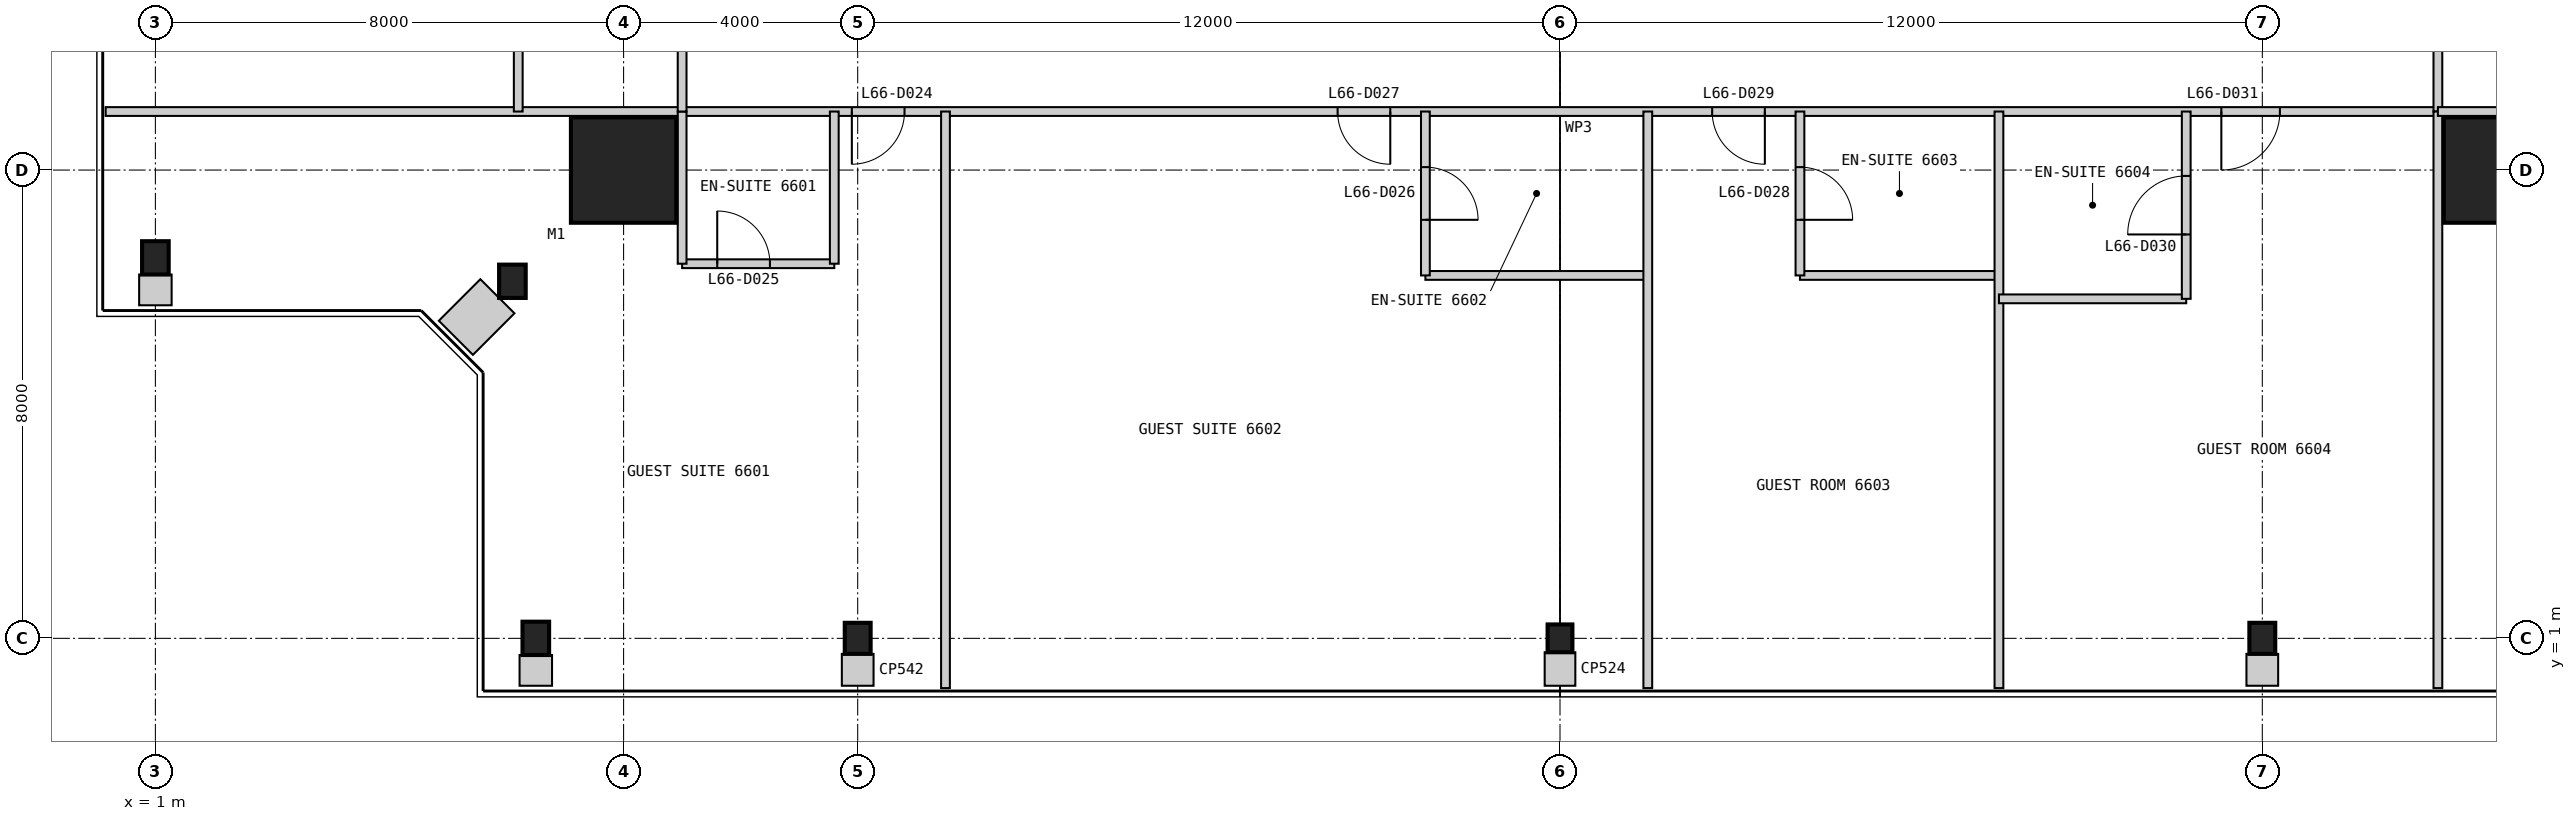
"""IFC4 building model, lengths in metres.
Left out: names, types, materials, properties, quantities, classifications, styles, units other than length and angle.
Written with IfcOpenShell. Run it as: python <this file> out.ifc"""

import sys

from ifc_helpers import new_model, si_unit, direction, frame, frame_2d, origin, origin_2d, place, context, subcontext, project, spatial, rectangle, i_section, extrude, element, fill, save


model = new_model("IFC4")
c1 = context("Model", 3, precision=1e-05, world=origin(), true_north=direction((0.0, 1.0)))
c2 = subcontext(c1, "Body", "Model", "MODEL_VIEW")
j1 = project(units=[si_unit("LENGTHUNIT", "METRE"), si_unit("PLANEANGLEUNIT", "RADIAN")], contexts=[c1])
p1 = place(None, origin())
s1 = spatial("IfcSite", under=j1, at=p1, CompositionType="ELEMENT")
p2 = place(p1, origin())
s2 = spatial("IfcBuilding", under=s1, at=p2, CompositionType="ELEMENT")
p3 = place(p2, frame((0.0, 0.0, 276.4)))
s3 = spatial("IfcBuildingStorey", under=s2, at=p3, CompositionType="ELEMENT", Elevation=276.4)
for number, where, z_axis, x_axis in (
    (1, (9.0, 9.0, 0.0), (0.0, 0.0, 1.0), (1.0, 0.0, 0.0)),
    (2, (41.0, 9.0, 0.0), (0.0, 0.0, 1.0), (1.0, 0.0, 0.0)),
):
    element("IfcColumn", number, at=place(p3, frame(where, z_axis=z_axis, x_axis=x_axis)), inside=s3, PredefinedType="COLUMN", context=c2, shape_type="SweptSolid", body=[
        extrude(rectangle(XDim=1.8, YDim=1.8, at=origin_2d()), origin(), (0.0, 0.0, 1.0), 3.4),
    ])
p4 = place(p3, frame((7.5, 1.0, 0.0), z_axis=(0.0, 0.0, 1.0), x_axis=(1.0, 0.0, 0.0)))
e3 = element("IfcColumn", 3, at=p4, inside=s3, PredefinedType="COLUMN", context=c2, shape_type="SweptSolid", body=[
    extrude(i_section(OverallWidth=0.455, OverallDepth=0.569, WebThickness=0.078, FlangeThickness=0.125, at=origin_2d()), origin(), (0.0, 0.0, 1.0), 3.4),
])
p5 = place(p3, frame((13.0, 1.0, 0.0), z_axis=(0.0, 0.0, 1.0), x_axis=(1.0, 0.0, 0.0)))
e4 = element("IfcColumn", 4, at=p5, inside=s3, PredefinedType="COLUMN", context=c2, shape_type="SweptSolid", body=[
    extrude(i_section(OverallWidth=0.442, OverallDepth=0.531, WebThickness=0.066, FlangeThickness=0.106, at=origin_2d()), origin(), (0.0, 0.0, 1.0), 3.4),
])
p6 = place(p3, frame((25.0, 1.0, 0.0), z_axis=(0.0, 0.0, 1.0), x_axis=(1.0, 0.0, 0.0)))
e5 = element("IfcColumn", 5, at=p6, inside=s3, PredefinedType="COLUMN", context=c2, shape_type="SweptSolid", body=[
    extrude(i_section(OverallWidth=0.424, OverallDepth=0.475, WebThickness=0.048, FlangeThickness=0.077, at=origin_2d()), origin(), (0.0, 0.0, 1.0), 3.4),
])
p7 = place(p3, frame((37.0, 1.0, 0.0), z_axis=(0.0, 0.0, 1.0), x_axis=(1.0, 0.0, 0.0)))
e6 = element("IfcColumn", 6, at=p7, inside=s3, PredefinedType="COLUMN", context=c2, shape_type="SweptSolid", body=[
    extrude(i_section(OverallWidth=0.442, OverallDepth=0.531, WebThickness=0.066, FlangeThickness=0.106, at=origin_2d()), origin(), (0.0, 0.0, 1.0), 3.4),
])
for number, where, z_axis, x_axis in (
    (7, (1.0, 7.5, 0.0), (0.0, 0.0, 1.0), (1.0, 0.0, 0.0)),
    (8, (7.1, 7.1, 0.0), (0.0, 0.0, 1.0), (1.0, 0.0, 0.0)),
):
    element("IfcColumn", number, at=place(p3, frame(where, z_axis=z_axis, x_axis=x_axis)), inside=s3, PredefinedType="COLUMN", context=c2, shape_type="SweptSolid", body=[
        extrude(i_section(OverallWidth=0.455, OverallDepth=0.569, WebThickness=0.078, FlangeThickness=0.125, at=origin_2d()), origin(), (0.0, 0.0, 1.0), 3.4),
    ])
p8 = place(p3, frame((10.0, 10.0, 0.0), z_axis=(0.0, 0.0, 1.0), x_axis=(1.0, 0.0, 0.0)))
e9 = element("IfcWall", 9, at=p8, inside=s3, PredefinedType="PARTITIONING", context=c2, shape_type="SweptSolid", body=[
    extrude(rectangle(XDim=30.0, YDim=0.15, at=frame_2d((15.0, 0.0))), origin(), (0.0, 0.0, 1.0), 3.25),
])
p9 = place(p8, frame((2.9, 0.0, 0.0)))
e10 = element("IfcOpeningElement", 10, at=p9, cuts=e9, PredefinedType="OPENING", context=c2, shape_type="SweptSolid", body=[
    extrude(rectangle(XDim=0.9, YDim=2.1, at=frame_2d((0.45, 1.05))), frame((0.0, 0.085, 0.0), z_axis=(0.0, -1.0, 0.0), x_axis=(1.0, 0.0, 0.0)), (0.0, 0.0, 1.0), 0.17),
])
p10 = place(p8, frame((11.2, 0.0, 0.0)))
e11 = element("IfcOpeningElement", 11, at=p10, cuts=e9, PredefinedType="OPENING", context=c2, shape_type="SweptSolid", body=[
    extrude(rectangle(XDim=0.9, YDim=2.1, at=frame_2d((0.45, 1.05))), frame((0.0, 0.085, 0.0), z_axis=(0.0, -1.0, 0.0), x_axis=(1.0, 0.0, 0.0)), (0.0, 0.0, 1.0), 0.17),
])
p11 = place(p8, frame((17.6, 0.0, 0.0)))
e12 = element("IfcOpeningElement", 12, at=p11, cuts=e9, PredefinedType="OPENING", context=c2, shape_type="SweptSolid", body=[
    extrude(rectangle(XDim=0.9, YDim=2.1, at=frame_2d((0.45, 1.05))), frame((0.0, 0.085, 0.0), z_axis=(0.0, -1.0, 0.0), x_axis=(1.0, 0.0, 0.0)), (0.0, 0.0, 1.0), 0.17),
])
p12 = place(p8, frame((26.3, 0.0, 0.0)))
e13 = element("IfcOpeningElement", 13, at=p12, cuts=e9, PredefinedType="OPENING", context=c2, shape_type="SweptSolid", body=[
    extrude(rectangle(XDim=1.0, YDim=2.1, at=frame_2d((0.5, 1.05))), frame((0.0, 0.085, 0.0), z_axis=(0.0, -1.0, 0.0), x_axis=(1.0, 0.0, 0.0)), (0.0, 0.0, 1.0), 0.17),
])
p13 = place(p3, frame((0.15, 10.0, 0.0), z_axis=(0.0, 0.0, 1.0), x_axis=(1.0, 0.0, 0.0)))
e14 = element("IfcWall", 14, at=p13, inside=s3, PredefinedType="PARTITIONING", context=c2, shape_type="SweptSolid", body=[
    extrude(rectangle(XDim=9.85, YDim=0.15, at=frame_2d((4.925, 0.0))), origin(), (0.0, 0.0, 1.0), 3.25),
])
p14 = place(p3, frame((10.0, 7.4, 0.0), z_axis=(0.0, 0.0, 1.0), x_axis=(1.0, 0.0, 0.0)))
e15 = element("IfcWall", 15, at=p14, inside=s3, PredefinedType="PARTITIONING", context=c2, shape_type="SweptSolid", body=[
    extrude(rectangle(XDim=2.6, YDim=0.15, at=frame_2d((1.3, 0.0))), origin(), (0.0, 0.0, 1.0), 3.25),
])
p15 = place(p14, frame((0.6, 0.0, 0.0)))
e16 = element("IfcOpeningElement", 16, at=p15, cuts=e15, PredefinedType="OPENING", context=c2, shape_type="SweptSolid", body=[
    extrude(rectangle(XDim=0.9, YDim=2.1, at=frame_2d((0.45, 1.05))), frame((0.0, 0.085, 0.0), z_axis=(0.0, -1.0, 0.0), x_axis=(1.0, 0.0, 0.0)), (0.0, 0.0, 1.0), 0.17),
])
for number, where, z_axis, x_axis in (
    (17, (10.0, 7.4, 0.0), (0.0, 0.0, 1.0), (0.0, 1.0, 0.0)),
    (18, (12.6, 7.4, 0.0), (0.0, 0.0, 1.0), (0.0, 1.0, 0.0)),
):
    element("IfcWall", number, at=place(p3, frame(where, z_axis=z_axis, x_axis=x_axis)), inside=s3, PredefinedType="PARTITIONING", context=c2, shape_type="SweptSolid", body=[
        extrude(rectangle(XDim=2.6, YDim=0.15, at=frame_2d((1.3, 0.0))), origin(), (0.0, 0.0, 1.0), 3.25),
    ])
p16 = place(p3, frame((14.5, 0.15, 0.0), z_axis=(0.0, 0.0, 1.0), x_axis=(0.0, 1.0, 0.0)))
e19 = element("IfcWall", 19, at=p16, inside=s3, PredefinedType="PARTITIONING", context=c2, shape_type="SweptSolid", body=[
    extrude(rectangle(XDim=9.85, YDim=0.15, at=frame_2d((4.925, 0.0))), origin(), (0.0, 0.0, 1.0), 3.25),
])
p17 = place(p3, frame((22.7, 7.2, 0.0), z_axis=(0.0, 0.0, 1.0), x_axis=(1.0, 0.0, 0.0)))
e20 = element("IfcWall", 20, at=p17, inside=s3, PredefinedType="PARTITIONING", context=c2, shape_type="SweptSolid", body=[
    extrude(rectangle(XDim=3.8, YDim=0.15, at=frame_2d((1.9, 0.0))), origin(), (0.0, 0.0, 1.0), 3.25),
])
p18 = place(p3, frame((22.7, 7.2, 0.0), z_axis=(0.0, 0.0, 1.0), x_axis=(0.0, 1.0, 0.0)))
e21 = element("IfcWall", 21, at=p18, inside=s3, PredefinedType="PARTITIONING", context=c2, shape_type="SweptSolid", body=[
    extrude(rectangle(XDim=2.8, YDim=0.15, at=frame_2d((1.4, 0.0))), origin(), (0.0, 0.0, 1.0), 3.25),
])
p19 = place(p18, frame((0.95, 0.0, 0.0)))
e22 = element("IfcOpeningElement", 22, at=p19, cuts=e21, PredefinedType="OPENING", context=c2, shape_type="SweptSolid", body=[
    extrude(rectangle(XDim=0.9, YDim=2.1, at=frame_2d((0.45, 1.05))), frame((0.0, 0.085, 0.0), z_axis=(0.0, -1.0, 0.0), x_axis=(1.0, 0.0, 0.0)), (0.0, 0.0, 1.0), 0.17),
])
p20 = place(p3, frame((26.5, 0.15, 0.0), z_axis=(0.0, 0.0, 1.0), x_axis=(0.0, 1.0, 0.0)))
e23 = element("IfcWall", 23, at=p20, inside=s3, PredefinedType="PARTITIONING", context=c2, shape_type="SweptSolid", body=[
    extrude(rectangle(XDim=9.85, YDim=0.15, at=frame_2d((4.925, 0.0))), origin(), (0.0, 0.0, 1.0), 3.25),
])
p21 = place(p3, frame((29.1, 7.2, 0.0), z_axis=(0.0, 0.0, 1.0), x_axis=(1.0, 0.0, 0.0)))
e24 = element("IfcWall", 24, at=p21, inside=s3, PredefinedType="PARTITIONING", context=c2, shape_type="SweptSolid", body=[
    extrude(rectangle(XDim=3.4, YDim=0.15, at=frame_2d((1.7, 0.0))), origin(), (0.0, 0.0, 1.0), 3.25),
])
p22 = place(p3, frame((29.1, 7.2, 0.0), z_axis=(0.0, 0.0, 1.0), x_axis=(0.0, 1.0, 0.0)))
e25 = element("IfcWall", 25, at=p22, inside=s3, PredefinedType="PARTITIONING", context=c2, shape_type="SweptSolid", body=[
    extrude(rectangle(XDim=2.8, YDim=0.15, at=frame_2d((1.4, 0.0))), origin(), (0.0, 0.0, 1.0), 3.25),
])
p23 = place(p22, frame((0.95, 0.0, 0.0)))
e26 = element("IfcOpeningElement", 26, at=p23, cuts=e25, PredefinedType="OPENING", context=c2, shape_type="SweptSolid", body=[
    extrude(rectangle(XDim=0.9, YDim=2.1, at=frame_2d((0.45, 1.05))), frame((0.0, 0.085, 0.0), z_axis=(0.0, -1.0, 0.0), x_axis=(1.0, 0.0, 0.0)), (0.0, 0.0, 1.0), 0.17),
])
p24 = place(p3, frame((32.5, 0.15, 0.0), z_axis=(0.0, 0.0, 1.0), x_axis=(0.0, 1.0, 0.0)))
e27 = element("IfcWall", 27, at=p24, inside=s3, PredefinedType="PARTITIONING", context=c2, shape_type="SweptSolid", body=[
    extrude(rectangle(XDim=9.85, YDim=0.15, at=frame_2d((4.925, 0.0))), origin(), (0.0, 0.0, 1.0), 3.25),
])
p25 = place(p3, frame((32.5, 6.8, 0.0), z_axis=(0.0, 0.0, 1.0), x_axis=(1.0, 0.0, 0.0)))
e28 = element("IfcWall", 28, at=p25, inside=s3, PredefinedType="PARTITIONING", context=c2, shape_type="SweptSolid", body=[
    extrude(rectangle(XDim=3.2, YDim=0.15, at=frame_2d((1.6, 0.0))), origin(), (0.0, 0.0, 1.0), 3.25),
])
p26 = place(p3, frame((35.7, 6.8, 0.0), z_axis=(0.0, 0.0, 1.0), x_axis=(0.0, 1.0, 0.0)))
e29 = element("IfcWall", 29, at=p26, inside=s3, PredefinedType="PARTITIONING", context=c2, shape_type="SweptSolid", body=[
    extrude(rectangle(XDim=3.2, YDim=0.15, at=frame_2d((1.6, 0.0))), origin(), (0.0, 0.0, 1.0), 3.25),
])
p27 = place(p26, frame((1.1, 0.0, 0.0)))
e30 = element("IfcOpeningElement", 30, at=p27, cuts=e29, PredefinedType="OPENING", context=c2, shape_type="SweptSolid", body=[
    extrude(rectangle(XDim=1.0, YDim=2.1, at=frame_2d((0.5, 1.05))), frame((0.0, 0.085, 0.0), z_axis=(0.0, -1.0, 0.0), x_axis=(1.0, 0.0, 0.0)), (0.0, 0.0, 1.0), 0.17),
])
p28 = place(p3, frame((40.0, 10.0, 0.0), z_axis=(0.0, 0.0, 1.0), x_axis=(0.0, 1.0, 0.0)))
e31 = element("IfcWall", 31, at=p28, inside=s3, PredefinedType="PARTITIONING", context=c2, shape_type="SweptSolid", body=[
    extrude(rectangle(XDim=30.0, YDim=0.15, at=frame_2d((15.0, 0.0))), origin(), (0.0, 0.0, 1.0), 2.638),
])
p29 = place(p28, frame((2.9, 0.0, 0.0)))
e32 = element("IfcOpeningElement", 32, at=p29, cuts=e31, PredefinedType="OPENING", context=c2, shape_type="SweptSolid", body=[
    extrude(rectangle(XDim=0.9, YDim=2.1, at=frame_2d((0.45, 1.05))), frame((0.0, 0.085, 0.0), z_axis=(0.0, -1.0, 0.0), x_axis=(1.0, 0.0, 0.0)), (0.0, 0.0, 1.0), 0.17),
])
p30 = place(p28, frame((11.2, 0.0, 0.0)))
e33 = element("IfcOpeningElement", 33, at=p30, cuts=e31, PredefinedType="OPENING", context=c2, shape_type="SweptSolid", body=[
    extrude(rectangle(XDim=0.9, YDim=2.1, at=frame_2d((0.45, 1.05))), frame((0.0, 0.085, 0.0), z_axis=(0.0, -1.0, 0.0), x_axis=(1.0, 0.0, 0.0)), (0.0, 0.0, 1.0), 0.17),
])
p31 = place(p28, frame((24.7, 0.0, 0.0)))
e34 = element("IfcOpeningElement", 34, at=p31, cuts=e31, PredefinedType="OPENING", context=c2, shape_type="SweptSolid", body=[
    extrude(rectangle(XDim=0.9, YDim=2.1, at=frame_2d((0.45, 1.05))), frame((0.0, 0.085, 0.0), z_axis=(0.0, -1.0, 0.0), x_axis=(1.0, 0.0, 0.0)), (0.0, 0.0, 1.0), 0.17),
])
p32 = place(p3, frame((40.0, 0.15, 0.0), z_axis=(0.0, 0.0, 1.0), x_axis=(0.0, 1.0, 0.0)))
e35 = element("IfcWall", 35, at=p32, inside=s3, PredefinedType="PARTITIONING", context=c2, shape_type="SweptSolid", body=[
    extrude(rectangle(XDim=9.85, YDim=0.15, at=frame_2d((4.925, 0.0))), origin(), (0.0, 0.0, 1.0), 3.25),
])
p33 = place(p3, frame((42.6, 10.0, 0.0), z_axis=(0.0, 0.0, 1.0), x_axis=(-1.0, 0.0, 0.0)))
e36 = element("IfcWall", 36, at=p33, inside=s3, PredefinedType="PARTITIONING", context=c2, shape_type="SweptSolid", body=[
    extrude(rectangle(XDim=2.6, YDim=0.15, at=frame_2d((1.3, 0.0))), origin(), (0.0, 0.0, 1.0), 3.25),
])
p34 = place(p3, frame((10.0, 40.0, 0.0), z_axis=(0.0, 0.0, 1.0), x_axis=(0.0, -1.0, 0.0)))
e37 = element("IfcWall", 37, at=p34, inside=s3, PredefinedType="PARTITIONING", context=c2, shape_type="SweptSolid", body=[
    extrude(rectangle(XDim=30.0, YDim=0.15, at=frame_2d((15.0, 0.0))), origin(), (0.0, 0.0, 1.0), 2.638),
])
p35 = place(p34, frame((2.9, 0.0, 0.0)))
e38 = element("IfcOpeningElement", 38, at=p35, cuts=e37, PredefinedType="OPENING", context=c2, shape_type="SweptSolid", body=[
    extrude(rectangle(XDim=0.9, YDim=2.1, at=frame_2d((0.45, 1.05))), frame((0.0, 0.085, 0.0), z_axis=(0.0, -1.0, 0.0), x_axis=(1.0, 0.0, 0.0)), (0.0, 0.0, 1.0), 0.17),
])
p36 = place(p34, frame((11.2, 0.0, 0.0)))
e39 = element("IfcOpeningElement", 39, at=p36, cuts=e37, PredefinedType="OPENING", context=c2, shape_type="SweptSolid", body=[
    extrude(rectangle(XDim=0.9, YDim=2.1, at=frame_2d((0.45, 1.05))), frame((0.0, 0.085, 0.0), z_axis=(0.0, -1.0, 0.0), x_axis=(1.0, 0.0, 0.0)), (0.0, 0.0, 1.0), 0.17),
])
p37 = place(p34, frame((24.7, 0.0, 0.0)))
e40 = element("IfcOpeningElement", 40, at=p37, cuts=e37, PredefinedType="OPENING", context=c2, shape_type="SweptSolid", body=[
    extrude(rectangle(XDim=0.9, YDim=2.1, at=frame_2d((0.45, 1.05))), frame((0.0, 0.085, 0.0), z_axis=(0.0, -1.0, 0.0), x_axis=(1.0, 0.0, 0.0)), (0.0, 0.0, 1.0), 0.17),
])
p38 = place(p3, frame((7.2, 13.8, 0.0), z_axis=(0.0, 0.0, 1.0), x_axis=(0.0, -1.0, 0.0)))
e41 = element("IfcWall", 41, at=p38, inside=s3, PredefinedType="PARTITIONING", context=c2, shape_type="SweptSolid", body=[
    extrude(rectangle(XDim=3.8, YDim=0.15, at=frame_2d((1.9, 0.0))), origin(), (0.0, 0.0, 1.0), 3.25),
])
p39 = place(p3, frame((7.5, 0.19, 0.0), z_axis=(0.0, 0.0, 1.0), x_axis=(0.0, 1.0, 0.0)))
e42 = element("IfcWall", 42, at=p39, inside=s3, PredefinedType="PARTITIONING", context=c2, shape_type="SweptSolid", body=[
    extrude(rectangle(XDim=0.526, YDim=0.555, at=frame_2d((0.263, 0.0))), origin(), (0.0, 0.0, 1.0), 3.25),
])
p40 = place(p3, frame((13.0, 0.19, 0.0), z_axis=(0.0, 0.0, 1.0), x_axis=(0.0, 1.0, 0.0)))
e43 = element("IfcWall", 43, at=p40, inside=s3, PredefinedType="PARTITIONING", context=c2, shape_type="SweptSolid", body=[
    extrude(rectangle(XDim=0.545, YDim=0.542, at=frame_2d((0.272, 0.0))), origin(), (0.0, 0.0, 1.0), 3.25),
])
p41 = place(p3, frame((1.0, 6.69, 0.0), z_axis=(0.0, 0.0, 1.0), x_axis=(0.0, 1.0, 0.0)))
e44 = element("IfcWall", 44, at=p41, inside=s3, PredefinedType="PARTITIONING", context=c2, shape_type="SweptSolid", body=[
    extrude(rectangle(XDim=0.526, YDim=0.555, at=frame_2d((0.263, 0.0))), origin(), (0.0, 0.0, 1.0), 3.25),
])
p42 = place(p3, frame((6.134, 6.134, 0.0), z_axis=(0.0, 0.0, 1.0), x_axis=(0.707106781187, 0.707106781187, 0.0)))
e45 = element("IfcWall", 45, at=p42, inside=s3, PredefinedType="PARTITIONING", context=c2, shape_type="SweptSolid", body=[
    extrude(rectangle(XDim=1.004, YDim=0.824, at=frame_2d((0.502, 0.0))), origin(), (0.0, 0.0, 1.0), 3.25),
])
p43 = place(p3, frame((25.0, 0.19, 0.0), z_axis=(0.0, 0.0, 1.0), x_axis=(0.0, 1.0, 0.0)))
e46 = element("IfcWall", 46, at=p43, inside=s3, PredefinedType="PARTITIONING", context=c2, shape_type="SweptSolid", body=[
    extrude(rectangle(XDim=0.573, YDim=0.524, at=frame_2d((0.286, 0.0))), origin(), (0.0, 0.0, 1.0), 3.25),
])
p44 = place(p3, frame((37.0, 0.19, 0.0), z_axis=(0.0, 0.0, 1.0), x_axis=(0.0, 1.0, 0.0)))
e47 = element("IfcWall", 47, at=p44, inside=s3, PredefinedType="PARTITIONING", context=c2, shape_type="SweptSolid", body=[
    extrude(rectangle(XDim=0.545, YDim=0.542, at=frame_2d((0.272, 0.0))), origin(), (0.0, 0.0, 1.0), 3.25),
])
p45 = place(p9, frame((0.9, 0.0, 0.0), z_axis=(0.0, 0.0, 1.0), x_axis=(-1.0, 0.0, 0.0)))
e48 = element("IfcDoor", 48, at=p45, inside=s3, OperationType="SINGLE_SWING_RIGHT", PredefinedType="DOOR", context=c2, shape_type="SweptSolid", body=[
    extrude(rectangle(XDim=0.9, YDim=2.1, at=frame_2d((0.45, 1.05))), frame((0.0, 0.025, 0.0), z_axis=(0.0, -1.0, 0.0), x_axis=(1.0, 0.0, 0.0)), (0.0, 0.0, 1.0), 0.05),
])
fill(e10, e48)
p46 = place(p15, origin())
e49 = element("IfcDoor", 49, at=p46, inside=s3, OperationType="SINGLE_SWING_LEFT", PredefinedType="DOOR", context=c2, shape_type="SweptSolid", body=[
    extrude(rectangle(XDim=0.9, YDim=2.1, at=frame_2d((0.45, 1.05))), frame((0.0, 0.025, 0.0), z_axis=(0.0, -1.0, 0.0), x_axis=(1.0, 0.0, 0.0)), (0.0, 0.0, 1.0), 0.05),
])
fill(e16, e49)
p47 = place(p19, frame((0.9, 0.0, 0.0), z_axis=(0.0, 0.0, 1.0), x_axis=(-1.0, 0.0, 0.0)))
e50 = element("IfcDoor", 50, at=p47, inside=s3, OperationType="SINGLE_SWING_RIGHT", PredefinedType="DOOR", context=c2, shape_type="SweptSolid", body=[
    extrude(rectangle(XDim=0.9, YDim=2.1, at=frame_2d((0.45, 1.05))), frame((0.0, 0.025, 0.0), z_axis=(0.0, -1.0, 0.0), x_axis=(1.0, 0.0, 0.0)), (0.0, 0.0, 1.0), 0.05),
])
fill(e22, e50)
p48 = place(p10, frame((0.9, 0.0, 0.0), z_axis=(0.0, 0.0, 1.0), x_axis=(-1.0, 0.0, 0.0)))
e51 = element("IfcDoor", 51, at=p48, inside=s3, OperationType="SINGLE_SWING_LEFT", PredefinedType="DOOR", context=c2, shape_type="SweptSolid", body=[
    extrude(rectangle(XDim=0.9, YDim=2.1, at=frame_2d((0.45, 1.05))), frame((0.0, 0.025, 0.0), z_axis=(0.0, -1.0, 0.0), x_axis=(1.0, 0.0, 0.0)), (0.0, 0.0, 1.0), 0.05),
])
fill(e11, e51)
p49 = place(p23, frame((0.9, 0.0, 0.0), z_axis=(0.0, 0.0, 1.0), x_axis=(-1.0, 0.0, 0.0)))
e52 = element("IfcDoor", 52, at=p49, inside=s3, OperationType="SINGLE_SWING_RIGHT", PredefinedType="DOOR", context=c2, shape_type="SweptSolid", body=[
    extrude(rectangle(XDim=0.9, YDim=2.1, at=frame_2d((0.45, 1.05))), frame((0.0, 0.025, 0.0), z_axis=(0.0, -1.0, 0.0), x_axis=(1.0, 0.0, 0.0)), (0.0, 0.0, 1.0), 0.05),
])
fill(e26, e52)
p50 = place(p11, frame((0.9, 0.0, 0.0), z_axis=(0.0, 0.0, 1.0), x_axis=(-1.0, 0.0, 0.0)))
e53 = element("IfcDoor", 53, at=p50, inside=s3, OperationType="SINGLE_SWING_LEFT", PredefinedType="DOOR", context=c2, shape_type="SweptSolid", body=[
    extrude(rectangle(XDim=0.9, YDim=2.1, at=frame_2d((0.45, 1.05))), frame((0.0, 0.025, 0.0), z_axis=(0.0, -1.0, 0.0), x_axis=(1.0, 0.0, 0.0)), (0.0, 0.0, 1.0), 0.05),
])
fill(e12, e53)
p51 = place(p27, origin())
e54 = element("IfcDoor", 54, at=p51, inside=s3, OperationType="SINGLE_SWING_LEFT", PredefinedType="DOOR", context=c2, shape_type="SweptSolid", body=[
    extrude(rectangle(XDim=1.0, YDim=2.1, at=frame_2d((0.5, 1.05))), frame((0.0, 0.025, 0.0), z_axis=(0.0, -1.0, 0.0), x_axis=(1.0, 0.0, 0.0)), (0.0, 0.0, 1.0), 0.05),
])
fill(e30, e54)
p52 = place(p12, frame((1.0, 0.0, 0.0), z_axis=(0.0, 0.0, 1.0), x_axis=(-1.0, 0.0, 0.0)))
e55 = element("IfcDoor", 55, at=p52, inside=s3, OperationType="SINGLE_SWING_RIGHT", PredefinedType="DOOR", context=c2, shape_type="SweptSolid", body=[
    extrude(rectangle(XDim=1.0, YDim=2.1, at=frame_2d((0.5, 1.05))), frame((0.0, 0.025, 0.0), z_axis=(0.0, -1.0, 0.0), x_axis=(1.0, 0.0, 0.0)), (0.0, 0.0, 1.0), 0.05),
])
fill(e13, e55)
save(model, sys.argv[1])
